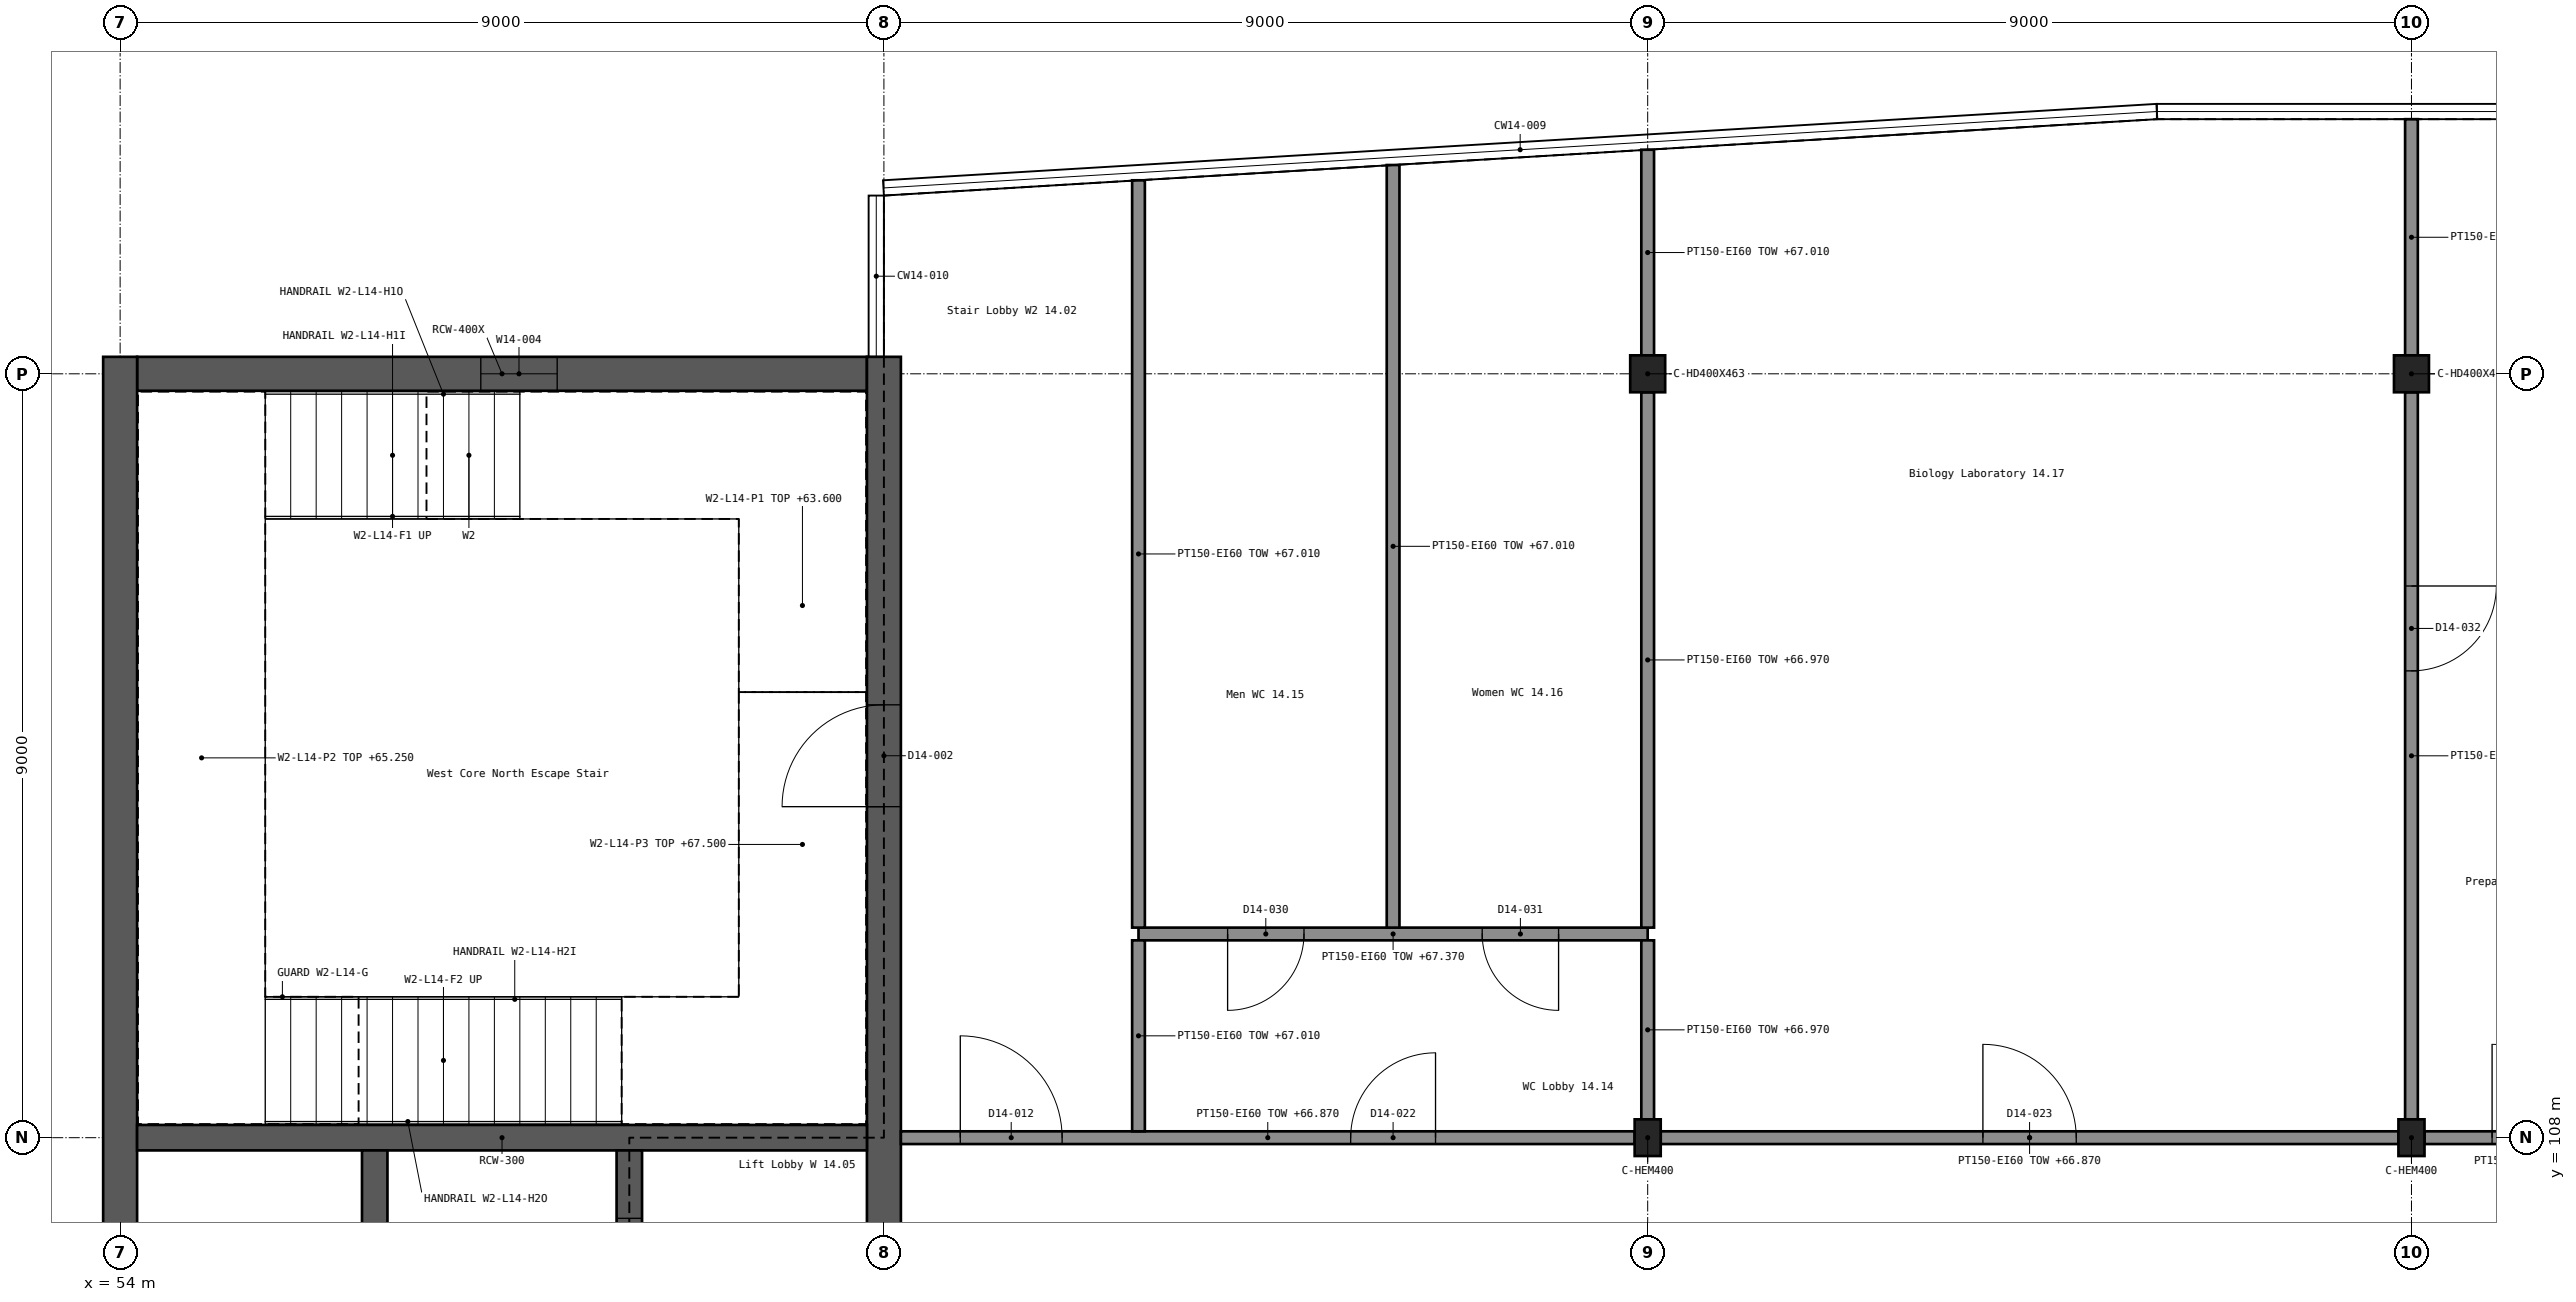
"""IFC4 building model, lengths in metres.
Left out: names, types, materials, properties, quantities, classifications, styles, units other than length and angle.
Written with IfcOpenShell. Run it as: python <this file> out.ifc"""

import sys

from ifc_helpers import new_model, si_unit, direction, frame, frame_2d, origin, origin_2d, place, context, subcontext, project, spatial, rectangle, i_section, extrude, element, fill, save


model = new_model("IFC4")
c1 = context("Model", 3, precision=1e-05, world=origin(), true_north=direction((0.0, 1.0)))
c2 = subcontext(c1, "Body", "Model", "MODEL_VIEW")
j1 = project(units=[si_unit("LENGTHUNIT", "METRE"), si_unit("PLANEANGLEUNIT", "RADIAN")], contexts=[c1])
p1 = place(None, origin())
s1 = spatial("IfcSite", under=j1, at=p1, CompositionType="ELEMENT")
p2 = place(p1, origin())
s2 = spatial("IfcBuilding", under=s1, at=p2, CompositionType="ELEMENT")
p3 = place(p2, frame((0.0, 0.0, 63.6)))
s3 = spatial("IfcBuildingStorey", under=s2, at=p3, CompositionType="ELEMENT", Elevation=63.6)
p4 = place(p3, frame((54.2, 117.0, 0.0), z_axis=(0.0, 0.0, 1.0), x_axis=(1.0, 0.0, 0.0)))
e1 = element("IfcWall", 1, at=p4, inside=s3, PredefinedType="SHEAR", context=c2, shape_type="SweptSolid", body=[
    extrude(rectangle(XDim=8.6, YDim=0.4, at=frame_2d((4.3, 0.0))), origin(), (0.0, 0.0, 1.0), 3.9),
])
p5 = place(p4, frame((4.05, 0.0, 1.2)))
e2 = element("IfcOpeningElement", 2, at=p5, cuts=e1, PredefinedType="OPENING", context=c2, shape_type="SweptSolid", body=[
    extrude(rectangle(XDim=0.9, YDim=1.5, at=frame_2d((0.45, 0.75))), frame((0.0, 0.211, 0.0), z_axis=(0.0, -1.0, 0.0), x_axis=(1.0, 0.0, 0.0)), (0.0, 0.0, 1.0), 0.422),
])
p6 = place(p3, frame((54.0, 89.8, 0.0), z_axis=(0.0, 0.0, 1.0), x_axis=(0.0, 1.0, 0.0)))
e3 = element("IfcWall", 3, at=p6, inside=s3, PredefinedType="SHEAR", context=c2, shape_type="SweptSolid", body=[
    extrude(rectangle(XDim=27.4, YDim=0.4, at=frame_2d((13.7, 0.0))), origin(), (0.0, 0.0, 1.0), 3.9),
])
p7 = place(p3, frame((63.0, 89.8, 0.0), z_axis=(0.0, 0.0, 1.0), x_axis=(0.0, 1.0, 0.0)))
e4 = element("IfcWall", 4, at=p7, inside=s3, PredefinedType="SHEAR", context=c2, shape_type="SweptSolid", body=[
    extrude(rectangle(XDim=27.4, YDim=0.4, at=frame_2d((13.7, 0.0))), origin(), (0.0, 0.0, 1.0), 3.9),
])
p8 = place(p7, frame((4.1, 0.0, 0.0)))
e5 = element("IfcOpeningElement", 5, at=p8, cuts=e4, PredefinedType="OPENING", context=c2, shape_type="SweptSolid", body=[
    extrude(rectangle(XDim=1.2, YDim=2.1, at=frame_2d((0.6, 1.05))), frame((0.0, 0.211, 0.0), z_axis=(0.0, -1.0, 0.0), x_axis=(1.0, 0.0, 0.0)), (0.0, 0.0, 1.0), 0.422),
])
p9 = place(p7, frame((22.1, 0.0, 0.0)))
e6 = element("IfcOpeningElement", 6, at=p9, cuts=e4, PredefinedType="OPENING", context=c2, shape_type="SweptSolid", body=[
    extrude(rectangle(XDim=1.2, YDim=2.1, at=frame_2d((0.6, 1.05))), frame((0.0, 0.211, 0.0), z_axis=(0.0, -1.0, 0.0), x_axis=(1.0, 0.0, 0.0)), (0.0, 0.0, 1.0), 0.422),
])
p10 = place(p7, frame((12.5, 0.0, 0.0)))
e7 = element("IfcOpeningElement", 7, at=p10, cuts=e4, PredefinedType="OPENING", context=c2, shape_type="SweptSolid", body=[
    extrude(rectangle(XDim=2.0, YDim=2.1, at=frame_2d((1.0, 1.05))), frame((0.0, 0.211, 0.0), z_axis=(0.0, -1.0, 0.0), x_axis=(1.0, 0.0, 0.0)), (0.0, 0.0, 1.0), 0.422),
])
p11 = place(p3, frame((54.2, 108.0, 0.0), z_axis=(0.0, 0.0, 1.0), x_axis=(1.0, 0.0, 0.0)))
e8 = element("IfcWall", 8, at=p11, inside=s3, PredefinedType="SHEAR", context=c2, shape_type="SweptSolid", body=[
    extrude(rectangle(XDim=8.6, YDim=0.3, at=frame_2d((4.3, 0.0))), origin(), (0.0, 0.0, 1.0), 3.9),
])
p12 = place(p3, frame((57.0, 99.15, 0.0), z_axis=(0.0, 0.0, 1.0), x_axis=(0.0, 1.0, 0.0)))
e9 = element("IfcWall", 9, at=p12, inside=s3, PredefinedType="SHEAR", context=c2, shape_type="SweptSolid", body=[
    extrude(rectangle(XDim=8.7, YDim=0.3, at=frame_2d((4.35, 0.0))), origin(), (0.0, 0.0, 1.0), 3.9),
])
p13 = place(p3, frame((60.0, 99.15, 0.0), z_axis=(0.0, 0.0, 1.0), x_axis=(0.0, 1.0, 0.0)))
e10 = element("IfcWall", 10, at=p13, inside=s3, PredefinedType="SHEAR", context=c2, shape_type="SweptSolid", body=[
    extrude(rectangle(XDim=8.7, YDim=0.3, at=frame_2d((4.35, 0.0))), origin(), (0.0, 0.0, 1.0), 3.9),
])
p14 = place(p13, frame((0.8, 0.0, 0.0)))
e11 = element("IfcOpeningElement", 11, at=p14, cuts=e10, PredefinedType="OPENING", context=c2, shape_type="SweptSolid", body=[
    extrude(rectangle(XDim=1.1, YDim=2.1, at=frame_2d((0.55, 1.05))), frame((0.0, 0.161, 0.0), z_axis=(0.0, -1.0, 0.0), x_axis=(1.0, 0.0, 0.0)), (0.0, 0.0, 1.0), 0.322),
])
p15 = place(p13, frame((3.8, 0.0, 0.0)))
e12 = element("IfcOpeningElement", 12, at=p15, cuts=e10, PredefinedType="OPENING", context=c2, shape_type="SweptSolid", body=[
    extrude(rectangle(XDim=1.1, YDim=2.1, at=frame_2d((0.55, 1.05))), frame((0.0, 0.161, 0.0), z_axis=(0.0, -1.0, 0.0), x_axis=(1.0, 0.0, 0.0)), (0.0, 0.0, 1.0), 0.322),
])
p16 = place(p13, frame((6.8, 0.0, 0.0)))
e13 = element("IfcOpeningElement", 13, at=p16, cuts=e10, PredefinedType="OPENING", context=c2, shape_type="SweptSolid", body=[
    extrude(rectangle(XDim=1.1, YDim=2.1, at=frame_2d((0.55, 1.05))), frame((0.0, 0.161, 0.0), z_axis=(0.0, -1.0, 0.0), x_axis=(1.0, 0.0, 0.0)), (0.0, 0.0, 1.0), 0.322),
])
for number, where, z_axis, x_axis in (
    (14, (72.0, 108.0, 0.0), (0.0, 0.0, 1.0), (1.0, 0.0, 0.0)),
    (15, (81.0, 108.0, 0.0), (0.0, 0.0, 1.0), (1.0, 0.0, 0.0)),
):
    element("IfcColumn", number, at=place(p3, frame(where, z_axis=z_axis, x_axis=x_axis)), inside=s3, PredefinedType="COLUMN", context=c2, shape_type="SweptSolid", body=[
        extrude(i_section(OverallWidth=0.307, OverallDepth=0.432, WebThickness=0.021, FlangeThickness=0.04, FilletRadius=0.027, at=origin_2d()), origin(), (0.0, 0.0, 1.0), 3.9),
    ])
for number, where, z_axis, x_axis in (
    (16, (72.0, 117.0, 0.0), (0.0, 0.0, 1.0), (1.0, 0.0, 0.0)),
    (17, (81.0, 117.0, 0.0), (0.0, 0.0, 1.0), (1.0, 0.0, 0.0)),
):
    element("IfcColumn", number, at=place(p3, frame(where, z_axis=z_axis, x_axis=x_axis)), inside=s3, PredefinedType="COLUMN", context=c2, shape_type="SweptSolid", body=[
        extrude(i_section(OverallWidth=0.412, OverallDepth=0.435, WebThickness=0.036, FlangeThickness=0.057, FilletRadius=0.015, at=origin_2d()), origin(), (0.0, 0.0, 1.0), 3.9),
    ])
p17 = place(p3, frame((63.2, 108.0, 0.0), z_axis=(0.0, 0.0, 1.0), x_axis=(1.0, 0.0, 0.0)))
e18 = element("IfcWall", 18, at=p17, inside=s3, PredefinedType="PARTITIONING", context=c2, shape_type="SweptSolid", body=[
    extrude(rectangle(XDim=8.646, YDim=0.15, at=frame_2d((4.323, 0.0))), origin(), (0.0, 0.0, 1.0), 3.27),
])
p18 = place(p17, frame((0.7, 0.0, 0.0)))
e19 = element("IfcOpeningElement", 19, at=p18, cuts=e18, PredefinedType="OPENING", context=c2, shape_type="SweptSolid", body=[
    extrude(rectangle(XDim=1.2, YDim=2.1, at=frame_2d((0.6, 1.05))), frame((0.0, 0.086, 0.0), z_axis=(0.0, -1.0, 0.0), x_axis=(1.0, 0.0, 0.0)), (0.0, 0.0, 1.0), 0.172),
])
p19 = place(p17, frame((5.3, 0.0, 0.0)))
e20 = element("IfcOpeningElement", 20, at=p19, cuts=e18, PredefinedType="OPENING", context=c2, shape_type="SweptSolid", body=[
    extrude(rectangle(XDim=1.0, YDim=2.1, at=frame_2d((0.5, 1.05))), frame((0.0, 0.086, 0.0), z_axis=(0.0, -1.0, 0.0), x_axis=(1.0, 0.0, 0.0)), (0.0, 0.0, 1.0), 0.172),
])
p20 = place(p3, frame((72.154, 108.0, 0.0), z_axis=(0.0, 0.0, 1.0), x_axis=(1.0, 0.0, 0.0)))
e21 = element("IfcWall", 21, at=p20, inside=s3, PredefinedType="PARTITIONING", context=c2, shape_type="SweptSolid", body=[
    extrude(rectangle(XDim=8.693, YDim=0.15, at=frame_2d((4.346, 0.0))), origin(), (0.0, 0.0, 1.0), 3.27),
])
p21 = place(p20, frame((3.796, 0.0, 0.0)))
e22 = element("IfcOpeningElement", 22, at=p21, cuts=e21, PredefinedType="OPENING", context=c2, shape_type="SweptSolid", body=[
    extrude(rectangle(XDim=1.1, YDim=2.4, at=frame_2d((0.55, 1.2))), frame((0.0, 0.086, 0.0), z_axis=(0.0, -1.0, 0.0), x_axis=(1.0, 0.0, 0.0)), (0.0, 0.0, 1.0), 0.172),
])
p22 = place(p3, frame((81.154, 108.0, 0.0), z_axis=(0.0, 0.0, 1.0), x_axis=(1.0, 0.0, 0.0)))
e23 = element("IfcWall", 23, at=p22, inside=s3, PredefinedType="PARTITIONING", context=c2, shape_type="SweptSolid", body=[
    extrude(rectangle(XDim=2.846, YDim=0.15, at=frame_2d((1.423, 0.0))), origin(), (0.0, 0.0, 1.0), 3.27),
])
p23 = place(p22, frame((0.796, 0.0, 0.0)))
e24 = element("IfcOpeningElement", 24, at=p23, cuts=e23, PredefinedType="OPENING", context=c2, shape_type="SweptSolid", body=[
    extrude(rectangle(XDim=1.1, YDim=2.4, at=frame_2d((0.55, 1.2))), frame((0.0, 0.086, 0.0), z_axis=(0.0, -1.0, 0.0), x_axis=(1.0, 0.0, 0.0)), (0.0, 0.0, 1.0), 0.172),
])
p24 = place(p3, frame((66.0, 110.4, 0.0), z_axis=(0.0, 0.0, 1.0), x_axis=(1.0, 0.0, 0.0)))
e25 = element("IfcWall", 25, at=p24, inside=s3, PredefinedType="PARTITIONING", context=c2, shape_type="SweptSolid", body=[
    extrude(rectangle(XDim=6.0, YDim=0.15, at=frame_2d((3.0, 0.0))), origin(), (0.0, 0.0, 1.0), 3.77),
])
p25 = place(p24, frame((1.05, 0.0, 0.0)))
e26 = element("IfcOpeningElement", 26, at=p25, cuts=e25, PredefinedType="OPENING", context=c2, shape_type="SweptSolid", body=[
    extrude(rectangle(XDim=0.9, YDim=2.1, at=frame_2d((0.45, 1.05))), frame((0.0, 0.086, 0.0), z_axis=(0.0, -1.0, 0.0), x_axis=(1.0, 0.0, 0.0)), (0.0, 0.0, 1.0), 0.172),
])
p26 = place(p24, frame((4.05, 0.0, 0.0)))
e27 = element("IfcOpeningElement", 27, at=p26, cuts=e25, PredefinedType="OPENING", context=c2, shape_type="SweptSolid", body=[
    extrude(rectangle(XDim=0.9, YDim=2.1, at=frame_2d((0.45, 1.05))), frame((0.0, 0.086, 0.0), z_axis=(0.0, -1.0, 0.0), x_axis=(1.0, 0.0, 0.0)), (0.0, 0.0, 1.0), 0.172),
])
p27 = place(p3, frame((66.0, 108.075, 0.0), z_axis=(0.0, 0.0, 1.0), x_axis=(0.0, 1.0, 0.0)))
e28 = element("IfcWall", 28, at=p27, inside=s3, PredefinedType="PARTITIONING", context=c2, shape_type="SweptSolid", body=[
    extrude(rectangle(XDim=2.25, YDim=0.15, at=frame_2d((1.125, 0.0))), origin(), (0.0, 0.0, 1.0), 3.41),
])
p28 = place(p3, frame((66.0, 110.475, 0.0), z_axis=(0.0, 0.0, 1.0), x_axis=(0.0, 1.0, 0.0)))
e29 = element("IfcWall", 29, at=p28, inside=s3, PredefinedType="PARTITIONING", context=c2, shape_type="SweptSolid", body=[
    extrude(rectangle(XDim=8.805, YDim=0.15, at=frame_2d((4.402, 0.0))), origin(), (0.0, 0.0, 1.0), 3.41),
])
p29 = place(p3, frame((69.0, 110.475, 0.0), z_axis=(0.0, 0.0, 1.0), x_axis=(0.0, 1.0, 0.0)))
e30 = element("IfcWall", 30, at=p29, inside=s3, PredefinedType="PARTITIONING", context=c2, shape_type="SweptSolid", body=[
    extrude(rectangle(XDim=8.985, YDim=0.15, at=frame_2d((4.492, 0.0))), origin(), (0.0, 0.0, 1.0), 3.41),
])
p30 = place(p3, frame((72.0, 108.216, 0.0), z_axis=(0.0, 0.0, 1.0), x_axis=(0.0, 1.0, 0.0)))
e31 = element("IfcWall", 31, at=p30, inside=s3, PredefinedType="PARTITIONING", context=c2, shape_type="SweptSolid", body=[
    extrude(rectangle(XDim=2.109, YDim=0.15, at=frame_2d((1.054, 0.0))), origin(), (0.0, 0.0, 1.0), 3.37),
])
p31 = place(p3, frame((72.0, 110.475, 0.0), z_axis=(0.0, 0.0, 1.0), x_axis=(0.0, 1.0, 0.0)))
e32 = element("IfcWall", 32, at=p31, inside=s3, PredefinedType="PARTITIONING", context=c2, shape_type="SweptSolid", body=[
    extrude(rectangle(XDim=6.307, YDim=0.15, at=frame_2d((3.154, 0.0))), origin(), (0.0, 0.0, 1.0), 3.37),
])
p32 = place(p3, frame((72.0, 117.218, 0.0), z_axis=(0.0, 0.0, 1.0), x_axis=(0.0, 1.0, 0.0)))
e33 = element("IfcWall", 33, at=p32, inside=s3, PredefinedType="PARTITIONING", context=c2, shape_type="SweptSolid", body=[
    extrude(rectangle(XDim=2.422, YDim=0.15, at=frame_2d((1.211, 0.0))), origin(), (0.0, 0.0, 1.0), 3.41),
])
p33 = place(p3, frame((81.0, 108.216, 0.0), z_axis=(0.0, 0.0, 1.0), x_axis=(0.0, 1.0, 0.0)))
e34 = element("IfcWall", 34, at=p33, inside=s3, PredefinedType="PARTITIONING", context=c2, shape_type="SweptSolid", body=[
    extrude(rectangle(XDim=8.566, YDim=0.15, at=frame_2d((4.283, 0.0))), origin(), (0.0, 0.0, 1.0), 3.37),
])
p34 = place(p33, frame((5.284, 0.0, 0.0)))
e35 = element("IfcOpeningElement", 35, at=p34, cuts=e34, PredefinedType="OPENING", context=c2, shape_type="SweptSolid", body=[
    extrude(rectangle(XDim=1.0, YDim=2.1, at=frame_2d((0.5, 1.05))), frame((0.0, 0.086, 0.0), z_axis=(0.0, -1.0, 0.0), x_axis=(1.0, 0.0, 0.0)), (0.0, 0.0, 1.0), 0.172),
])
p35 = place(p3, frame((81.0, 117.218, 0.0), z_axis=(0.0, 0.0, 1.0), x_axis=(0.0, 1.0, 0.0)))
e36 = element("IfcWall", 36, at=p35, inside=s3, PredefinedType="PARTITIONING", context=c2, shape_type="SweptSolid", body=[
    extrude(rectangle(XDim=2.782, YDim=0.15, at=frame_2d((1.391, 0.0))), origin(), (0.0, 0.0, 1.0), 3.41),
])
p36 = place(p5, origin())
e37 = element("IfcWindow", 37, at=p36, inside=s3, PartitioningType="SINGLE_PANEL", PredefinedType="WINDOW", context=c2, shape_type="SweptSolid", body=[
    extrude(rectangle(XDim=0.9, YDim=1.5, at=frame_2d((0.45, 0.75))), frame((0.0, 0.03, 0.0), z_axis=(0.0, -1.0, 0.0), x_axis=(1.0, 0.0, 0.0)), (0.0, 0.0, 1.0), 0.06),
])
fill(e2, e37)
p37 = place(p9, origin())
e38 = element("IfcDoor", 38, at=p37, inside=s3, OperationType="SINGLE_SWING_LEFT", PredefinedType="DOOR", context=c2, shape_type="SweptSolid", body=[
    extrude(rectangle(XDim=1.2, YDim=2.1, at=frame_2d((0.6, 1.05))), frame((0.0, 0.025, 0.0), z_axis=(0.0, -1.0, 0.0), x_axis=(1.0, 0.0, 0.0)), (0.0, 0.0, 1.0), 0.05),
])
fill(e6, e38)
p38 = place(p16, origin())
e39 = element("IfcDoor", 39, at=p38, inside=s3, OperationType="DOUBLE_DOOR_SLIDING", PredefinedType="DOOR", context=c2, shape_type="SweptSolid", body=[
    extrude(rectangle(XDim=1.1, YDim=2.1, at=frame_2d((0.55, 1.05))), frame((0.0, 0.025, 0.0), z_axis=(0.0, -1.0, 0.0), x_axis=(1.0, 0.0, 0.0)), (0.0, 0.0, 1.0), 0.05),
])
fill(e13, e39)
p39 = place(p18, origin())
e40 = element("IfcDoor", 40, at=p39, inside=s3, OperationType="SINGLE_SWING_LEFT", PredefinedType="DOOR", context=c2, shape_type="SweptSolid", body=[
    extrude(rectangle(XDim=1.2, YDim=2.1, at=frame_2d((0.6, 1.05))), frame((0.0, 0.025, 0.0), z_axis=(0.0, -1.0, 0.0), x_axis=(1.0, 0.0, 0.0)), (0.0, 0.0, 1.0), 0.05),
])
fill(e19, e40)
p40 = place(p19, origin())
e41 = element("IfcDoor", 41, at=p40, inside=s3, OperationType="SINGLE_SWING_RIGHT", PredefinedType="DOOR", context=c2, shape_type="SweptSolid", body=[
    extrude(rectangle(XDim=1.0, YDim=2.1, at=frame_2d((0.5, 1.05))), frame((0.0, 0.025, 0.0), z_axis=(0.0, -1.0, 0.0), x_axis=(1.0, 0.0, 0.0)), (0.0, 0.0, 1.0), 0.05),
])
fill(e20, e41)
p41 = place(p21, origin())
e42 = element("IfcDoor", 42, at=p41, inside=s3, OperationType="SINGLE_SWING_LEFT", PredefinedType="DOOR", context=c2, shape_type="SweptSolid", body=[
    extrude(rectangle(XDim=1.1, YDim=2.4, at=frame_2d((0.55, 1.2))), frame((0.0, 0.025, 0.0), z_axis=(0.0, -1.0, 0.0), x_axis=(1.0, 0.0, 0.0)), (0.0, 0.0, 1.0), 0.05),
])
fill(e22, e42)
p42 = place(p23, origin())
e43 = element("IfcDoor", 43, at=p42, inside=s3, OperationType="SINGLE_SWING_LEFT", PredefinedType="DOOR", context=c2, shape_type="SweptSolid", body=[
    extrude(rectangle(XDim=1.1, YDim=2.4, at=frame_2d((0.55, 1.2))), frame((0.0, 0.025, 0.0), z_axis=(0.0, -1.0, 0.0), x_axis=(1.0, 0.0, 0.0)), (0.0, 0.0, 1.0), 0.05),
])
fill(e24, e43)
p43 = place(p25, frame((0.9, 0.0, 0.0), z_axis=(0.0, 0.0, 1.0), x_axis=(-1.0, 0.0, 0.0)))
e44 = element("IfcDoor", 44, at=p43, inside=s3, OperationType="SINGLE_SWING_RIGHT", PredefinedType="DOOR", context=c2, shape_type="SweptSolid", body=[
    extrude(rectangle(XDim=0.9, YDim=2.1, at=frame_2d((0.45, 1.05))), frame((0.0, 0.025, 0.0), z_axis=(0.0, -1.0, 0.0), x_axis=(1.0, 0.0, 0.0)), (0.0, 0.0, 1.0), 0.05),
])
fill(e26, e44)
p44 = place(p26, frame((0.9, 0.0, 0.0), z_axis=(0.0, 0.0, 1.0), x_axis=(-1.0, 0.0, 0.0)))
e45 = element("IfcDoor", 45, at=p44, inside=s3, OperationType="SINGLE_SWING_LEFT", PredefinedType="DOOR", context=c2, shape_type="SweptSolid", body=[
    extrude(rectangle(XDim=0.9, YDim=2.1, at=frame_2d((0.45, 1.05))), frame((0.0, 0.025, 0.0), z_axis=(0.0, -1.0, 0.0), x_axis=(1.0, 0.0, 0.0)), (0.0, 0.0, 1.0), 0.05),
])
fill(e27, e45)
p45 = place(p34, frame((1.0, 0.0, 0.0), z_axis=(0.0, 0.0, 1.0), x_axis=(-1.0, 0.0, 0.0)))
e46 = element("IfcDoor", 46, at=p45, inside=s3, OperationType="SINGLE_SWING_LEFT", PredefinedType="DOOR", context=c2, shape_type="SweptSolid", body=[
    extrude(rectangle(XDim=1.0, YDim=2.1, at=frame_2d((0.5, 1.05))), frame((0.0, 0.025, 0.0), z_axis=(0.0, -1.0, 0.0), x_axis=(1.0, 0.0, 0.0)), (0.0, 0.0, 1.0), 0.05),
])
fill(e35, e46)
save(model, sys.argv[1])
